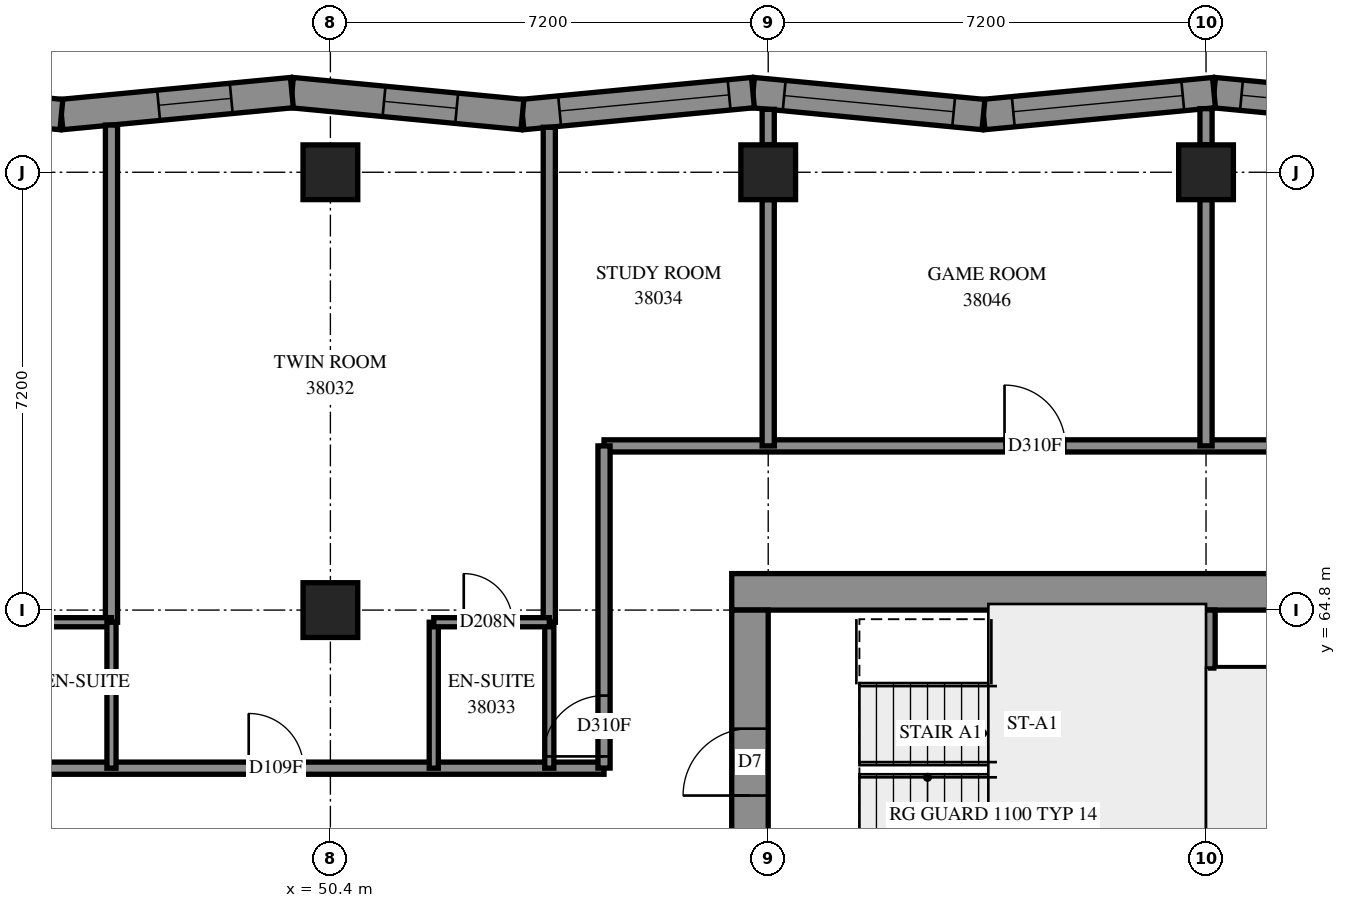
"""IFC4 building model, lengths in metres.
Left out: names, types, materials, properties, quantities, classifications, styles, units other than length and angle.
Written with IfcOpenShell. Run it as: python <this file> out.ifc"""

import sys

from ifc_helpers import new_model, si_unit, direction, frame, frame_2d, origin, origin_2d, place, context, subcontext, project, spatial, polyline, rectangle, outline, extrude, element, fill, save


model = new_model("IFC4")
c1 = context("Model", 3, precision=1e-05, world=origin(), true_north=direction((0.0, 1.0)))
c2 = subcontext(c1, "Body", "Model", "MODEL_VIEW")
j1 = project(units=[si_unit("LENGTHUNIT", "METRE"), si_unit("PLANEANGLEUNIT", "RADIAN")], contexts=[c1])
p1 = place(None, origin())
s1 = spatial("IfcSite", under=j1, at=p1, CompositionType="ELEMENT")
p2 = place(p1, origin())
s2 = spatial("IfcBuilding", under=s1, at=p2, CompositionType="ELEMENT")
p3 = place(p2, frame((0.0, 0.0, 142.2)))
s3 = spatial("IfcBuildingStorey", under=s2, at=p3, CompositionType="ELEMENT", Elevation=142.2)
for number, where, z_axis, x_axis in (
    (1, (50.4, 64.8, 0.0), (0.0, 0.0, 1.0), (1.0, 0.0, 0.0)),
    (2, (50.4, 72.0, 0.0), (0.0, 0.0, 1.0), (1.0, 0.0, 0.0)),
    (3, (57.6, 72.0, 0.0), (0.0, 0.0, 1.0), (1.0, 0.0, 0.0)),
    (4, (64.8, 72.0, 0.0), (0.0, 0.0, 1.0), (1.0, 0.0, 0.0)),
):
    element("IfcColumn", number, at=place(p3, frame(where, z_axis=z_axis, x_axis=x_axis)), inside=s3, PredefinedType="COLUMN", context=c2, shape_type="SweptSolid", body=[
        extrude(rectangle(XDim=0.9, YDim=0.9, at=origin_2d()), origin(), (0.0, 0.0, 1.0), 3.1),
    ])
p4 = place(p3, frame((57.0, 65.1, -0.3), z_axis=(0.0, 0.0, 1.0), x_axis=(1.0, 0.0, 0.0)))
e5 = element("IfcWall", 5, at=p4, inside=s3, PredefinedType="SHEAR", context=c2, shape_type="SweptSolid", body=[
    extrude(rectangle(XDim=15.6, YDim=0.6, at=frame_2d((7.8, 0.0))), origin(), (0.0, 0.0, 1.0), 2.7),
])
p5 = place(p4, frame((10.6, 0.0, 0.3)))
e6 = element("IfcOpeningElement", 6, at=p5, cuts=e5, PredefinedType="OPENING", context=c2, shape_type="SweptSolid", body=[
    extrude(rectangle(XDim=0.8, YDim=2.1, at=frame_2d((0.4, 1.05))), frame((0.0, 0.31, 0.0), z_axis=(0.0, -1.0, 0.0), x_axis=(1.0, 0.0, 0.0)), (0.0, 0.0, 1.0), 0.62),
])
p6 = place(p3, frame((57.3, 50.4, -0.3), z_axis=(0.0, 0.0, 1.0), x_axis=(0.0, 1.0, 0.0)))
e7 = element("IfcWall", 7, at=p6, inside=s3, PredefinedType="SHEAR", context=c2, shape_type="SweptSolid", body=[
    extrude(rectangle(XDim=14.4, YDim=0.6, at=frame_2d((7.2, 0.0))), origin(), (0.0, 0.0, 1.0), 2.7),
])
p7 = place(p6, frame((4.55, 0.0, 0.3)))
e8 = element("IfcOpeningElement", 8, at=p7, cuts=e7, PredefinedType="OPENING", context=c2, shape_type="SweptSolid", body=[
    extrude(rectangle(XDim=1.1, YDim=2.1, at=frame_2d((0.55, 1.05))), frame((0.0, 0.31, 0.0), z_axis=(0.0, -1.0, 0.0), x_axis=(1.0, 0.0, 0.0)), (0.0, 0.0, 1.0), 0.62),
])
p8 = place(p6, frame((11.35, 0.0, 0.3)))
e9 = element("IfcOpeningElement", 9, at=p8, cuts=e7, PredefinedType="OPENING", context=c2, shape_type="SweptSolid", body=[
    extrude(rectangle(XDim=1.1, YDim=2.1, at=frame_2d((0.55, 1.05))), frame((0.0, 0.31, 0.0), z_axis=(0.0, -1.0, 0.0), x_axis=(1.0, 0.0, 0.0)), (0.0, 0.0, 1.0), 0.62),
])
p9 = place(p3, frame((64.8, 60.6, 0.0), z_axis=(0.0, 0.0, 1.0), x_axis=(0.0, 1.0, 0.0)))
e10 = element("IfcWall", 10, at=p9, inside=s3, PredefinedType="SOLIDWALL", context=c2, shape_type="SweptSolid", body=[
    extrude(rectangle(XDim=4.2, YDim=0.3, at=frame_2d((2.1, 0.0))), origin(), (0.0, 0.0, 1.0), 3.1),
])
p10 = place(p3, frame((68.722, 72.949, 0.0), z_axis=(0.0, 0.0, 1.0), x_axis=(-0.9954966527, 0.0947967005, 0.0)))
e11 = element("IfcWall", 11, at=p10, inside=s3, PredefinedType="SOLIDWALL", context=c2, shape_type="SweptSolid", body=[
    extrude(outline(polyline([(0.024, -0.25), (3.832, -0.25), (3.784, 0.25), (-0.024, 0.25), (0.024, -0.25)])), origin(), (0.0, 0.0, 1.0), 3.1),
])
p11 = place(p10, frame((0.554, 0.0, 0.45)))
e12 = element("IfcOpeningElement", 12, at=p11, cuts=e11, PredefinedType="OPENING", context=c2, shape_type="SweptSolid", body=[
    extrude(rectangle(XDim=2.8, YDim=2.5, at=frame_2d((1.4, 1.25))), frame((0.0, 0.26, 0.0), z_axis=(0.0, -1.0, 0.0), x_axis=(1.0, 0.0, 0.0)), (0.0, 0.0, 1.0), 0.52),
])
p12 = place(p3, frame((64.931, 73.31, 0.0), z_axis=(0.0, 0.0, 1.0), x_axis=(-0.9954966527, -0.0947967005, 0.0)))
e13 = element("IfcWall", 13, at=p12, inside=s3, PredefinedType="SOLIDWALL", context=c2, shape_type="SweptSolid", body=[
    extrude(outline(polyline([(-0.024, -0.25), (3.784, -0.25), (3.832, 0.25), (0.024, 0.25), (-0.024, -0.25)])), origin(), (0.0, 0.0, 1.0), 3.1),
])
p13 = place(p12, frame((0.516, 0.0, 0.45)))
e14 = element("IfcOpeningElement", 14, at=p13, cuts=e13, PredefinedType="OPENING", context=c2, shape_type="SweptSolid", body=[
    extrude(rectangle(XDim=2.8, YDim=2.5, at=frame_2d((1.4, 1.25))), frame((0.0, 0.26, 0.0), z_axis=(0.0, -1.0, 0.0), x_axis=(1.0, 0.0, 0.0)), (0.0, 0.0, 1.0), 0.52),
])
p14 = place(p3, frame((61.14, 72.949, 0.0), z_axis=(0.0, 0.0, 1.0), x_axis=(-0.9954966527, 0.0947967005, 0.0)))
e15 = element("IfcWall", 15, at=p14, inside=s3, PredefinedType="SOLIDWALL", context=c2, shape_type="SweptSolid", body=[
    extrude(outline(polyline([(0.024, -0.25), (3.832, -0.25), (3.784, 0.25), (-0.024, 0.25), (0.024, -0.25)])), origin(), (0.0, 0.0, 1.0), 3.1),
])
p15 = place(p14, frame((0.492, 0.0, 0.45)))
e16 = element("IfcOpeningElement", 16, at=p15, cuts=e15, PredefinedType="OPENING", context=c2, shape_type="SweptSolid", body=[
    extrude(rectangle(XDim=2.8, YDim=2.5, at=frame_2d((1.4, 1.25))), frame((0.0, 0.26, 0.0), z_axis=(0.0, -1.0, 0.0), x_axis=(1.0, 0.0, 0.0)), (0.0, 0.0, 1.0), 0.52),
])
p16 = place(p3, frame((57.349, 73.31, 0.0), z_axis=(0.0, 0.0, 1.0), x_axis=(-0.9954966527, -0.0947967005, 0.0)))
e17 = element("IfcWall", 17, at=p16, inside=s3, PredefinedType="SOLIDWALL", context=c2, shape_type="SweptSolid", body=[
    extrude(outline(polyline([(-0.024, -0.25), (3.784, -0.25), (3.832, 0.25), (0.024, 0.25), (-0.024, -0.25)])), origin(), (0.0, 0.0, 1.0), 3.1),
])
p17 = place(p16, frame((0.394, 0.0, 0.45)))
e18 = element("IfcOpeningElement", 18, at=p17, cuts=e17, PredefinedType="OPENING", context=c2, shape_type="SweptSolid", body=[
    extrude(rectangle(XDim=2.8, YDim=2.5, at=frame_2d((1.4, 1.25))), frame((0.0, 0.26, 0.0), z_axis=(0.0, -1.0, 0.0), x_axis=(1.0, 0.0, 0.0)), (0.0, 0.0, 1.0), 0.52),
])
p18 = place(p3, frame((53.558, 72.949, 0.0), z_axis=(0.0, 0.0, 1.0), x_axis=(-0.9954966527, 0.0947967005, 0.0)))
e19 = element("IfcWall", 19, at=p18, inside=s3, PredefinedType="SOLIDWALL", context=c2, shape_type="SweptSolid", body=[
    extrude(outline(polyline([(0.024, -0.25), (3.832, -0.25), (3.784, 0.25), (-0.024, 0.25), (0.024, -0.25)])), origin(), (0.0, 0.0, 1.0), 3.1),
])
p19 = place(p18, frame((1.086, 0.0, 0.45)))
e20 = element("IfcOpeningElement", 20, at=p19, cuts=e19, PredefinedType="OPENING", context=c2, shape_type="SweptSolid", body=[
    extrude(rectangle(XDim=1.2, YDim=2.5, at=frame_2d((0.6, 1.25))), frame((0.0, 0.26, 0.0), z_axis=(0.0, -1.0, 0.0), x_axis=(1.0, 0.0, 0.0)), (0.0, 0.0, 1.0), 0.52),
])
p20 = place(p3, frame((49.767, 73.31, 0.0), z_axis=(0.0, 0.0, 1.0), x_axis=(-0.9954966527, -0.0947967005, 0.0)))
e21 = element("IfcWall", 21, at=p20, inside=s3, PredefinedType="SOLIDWALL", context=c2, shape_type="SweptSolid", body=[
    extrude(outline(polyline([(-0.024, -0.25), (3.784, -0.25), (3.832, 0.25), (0.024, 0.25), (-0.024, -0.25)])), origin(), (0.0, 0.0, 1.0), 3.1),
])
p21 = place(p20, frame((1.002, 0.0, 0.45)))
e22 = element("IfcOpeningElement", 22, at=p21, cuts=e21, PredefinedType="OPENING", context=c2, shape_type="SweptSolid", body=[
    extrude(rectangle(XDim=1.2, YDim=2.5, at=frame_2d((0.6, 1.25))), frame((0.0, 0.26, 0.0), z_axis=(0.0, -1.0, 0.0), x_axis=(1.0, 0.0, 0.0)), (0.0, 0.0, 1.0), 0.52),
])
p22 = place(p3, frame((45.976, 72.949, 0.0), z_axis=(0.0, 0.0, 1.0), x_axis=(-0.9954966527, 0.0947967005, 0.0)))
e23 = element("IfcWall", 23, at=p22, inside=s3, PredefinedType="SOLIDWALL", context=c2, shape_type="SweptSolid", body=[
    extrude(outline(polyline([(0.024, -0.25), (3.832, -0.25), (3.784, 0.25), (-0.024, 0.25), (0.024, -0.25)])), origin(), (0.0, 0.0, 1.0), 3.1),
])
p23 = place(p22, frame((0.894, 0.0, 0.45)))
e24 = element("IfcOpeningElement", 24, at=p23, cuts=e23, PredefinedType="OPENING", context=c2, shape_type="SweptSolid", body=[
    extrude(rectangle(XDim=1.2, YDim=2.5, at=frame_2d((0.6, 1.25))), frame((0.0, 0.26, 0.0), z_axis=(0.0, -1.0, 0.0), x_axis=(1.0, 0.0, 0.0)), (0.0, 0.0, 1.0), 0.52),
])
p24 = place(p3, frame((64.95, 63.78, 0.0), z_axis=(0.0, 0.0, 1.0), x_axis=(1.0, 0.0, 0.0)))
e25 = element("IfcWall", 25, at=p24, inside=s3, PredefinedType="PARTITIONING", context=c2, shape_type="SweptSolid", body=[
    extrude(rectangle(XDim=5.65, YDim=0.15, at=frame_2d((2.825, 0.0))), origin(), (0.0, 0.0, 1.0), 3.1),
])
p25 = place(p3, frame((54.9, 67.5, 0.0), z_axis=(0.0, 0.0, 1.0), x_axis=(1.0, 0.0, 0.0)))
e26 = element("IfcWall", 26, at=p25, inside=s3, PredefinedType="PARTITIONING", context=c2, shape_type="SweptSolid", body=[
    extrude(rectangle(XDim=19.8, YDim=0.2, at=frame_2d((9.9, 0.0))), origin(), (0.0, 0.0, 1.0), 3.1),
])
p26 = place(p25, frame((6.586, 0.0, 0.0)))
e27 = element("IfcOpeningElement", 27, at=p26, cuts=e26, PredefinedType="OPENING", context=c2, shape_type="SweptSolid", body=[
    extrude(rectangle(XDim=1.0, YDim=2.1, at=frame_2d((0.5, 1.05))), frame((0.0, 0.11, 0.0), z_axis=(0.0, -1.0, 0.0), x_axis=(1.0, 0.0, 0.0)), (0.0, 0.0, 1.0), 0.22),
])
p27 = place(p25, frame((14.089, 0.0, 0.0)))
e28 = element("IfcOpeningElement", 28, at=p27, cuts=e26, PredefinedType="OPENING", context=c2, shape_type="SweptSolid", body=[
    extrude(rectangle(XDim=1.0, YDim=2.1, at=frame_2d((0.5, 1.05))), frame((0.0, 0.11, 0.0), z_axis=(0.0, -1.0, 0.0), x_axis=(1.0, 0.0, 0.0)), (0.0, 0.0, 1.0), 0.22),
])
p28 = place(p3, frame((40.602, 62.2, 0.0), z_axis=(0.0, 0.0, 1.0), x_axis=(1.0, 0.0, 0.0)))
e29 = element("IfcWall", 29, at=p28, inside=s3, PredefinedType="PARTITIONING", context=c2, shape_type="SweptSolid", body=[
    extrude(rectangle(XDim=14.298, YDim=0.2, at=frame_2d((7.149, 0.0))), origin(), (0.0, 0.0, 1.0), 3.1),
])
p29 = place(p28, frame((1.306, 0.0, 0.0)))
e30 = element("IfcOpeningElement", 30, at=p29, cuts=e29, PredefinedType="OPENING", context=c2, shape_type="SweptSolid", body=[
    extrude(rectangle(XDim=0.9, YDim=2.1, at=frame_2d((0.45, 1.05))), frame((0.0, 0.11, 0.0), z_axis=(0.0, -1.0, 0.0), x_axis=(1.0, 0.0, 0.0)), (0.0, 0.0, 1.0), 0.22),
])
p30 = place(p28, frame((8.455, 0.0, 0.0)))
e31 = element("IfcOpeningElement", 31, at=p30, cuts=e29, PredefinedType="OPENING", context=c2, shape_type="SweptSolid", body=[
    extrude(rectangle(XDim=0.9, YDim=2.1, at=frame_2d((0.45, 1.05))), frame((0.0, 0.11, 0.0), z_axis=(0.0, -1.0, 0.0), x_axis=(1.0, 0.0, 0.0)), (0.0, 0.0, 1.0), 0.22),
])
p31 = place(p3, frame((46.8, 64.6, 0.0), z_axis=(0.0, 0.0, 1.0), x_axis=(0.0, 1.0, 0.0)))
e32 = element("IfcWall", 32, at=p31, inside=s3, PredefinedType="PARTITIONING", context=c2, shape_type="SweptSolid", body=[
    extrude(rectangle(XDim=8.176, YDim=0.2, at=frame_2d((4.088, 0.0))), origin(), (0.0, 0.0, 1.0), 3.1),
])
p32 = place(p3, frame((54.0, 64.6, 0.0), z_axis=(0.0, 0.0, 1.0), x_axis=(0.0, 1.0, 0.0)))
e33 = element("IfcWall", 33, at=p32, inside=s3, PredefinedType="PARTITIONING", context=c2, shape_type="SweptSolid", body=[
    extrude(rectangle(XDim=8.14, YDim=0.2, at=frame_2d((4.07, 0.0))), origin(), (0.0, 0.0, 1.0), 3.1),
])
p33 = place(p3, frame((54.9, 62.202, 0.0), z_axis=(0.0, 0.0, 1.0), x_axis=(0.0, 1.0, 0.0)))
e34 = element("IfcWall", 34, at=p33, inside=s3, PredefinedType="PARTITIONING", context=c2, shape_type="SweptSolid", body=[
    extrude(rectangle(XDim=5.298, YDim=0.2, at=frame_2d((2.649, 0.0))), origin(), (0.0, 0.0, 1.0), 3.1),
])
p34 = place(p33, frame((0.192, 0.0, 0.0)))
e35 = element("IfcOpeningElement", 35, at=p34, cuts=e34, PredefinedType="OPENING", context=c2, shape_type="SweptSolid", body=[
    extrude(rectangle(XDim=1.0, YDim=2.1, at=frame_2d((0.5, 1.05))), frame((0.0, 0.11, 0.0), z_axis=(0.0, -1.0, 0.0), x_axis=(1.0, 0.0, 0.0)), (0.0, 0.0, 1.0), 0.22),
])
for number, where, z_axis, x_axis in (
    (36, (57.6, 67.5, 0.0), (0.0, 0.0, 1.0), (0.0, 1.0, 0.0)),
    (37, (64.8, 67.5, 0.0), (0.0, 0.0, 1.0), (0.0, 1.0, 0.0)),
):
    element("IfcWall", number, at=place(p3, frame(where, z_axis=z_axis, x_axis=x_axis)), inside=s3, PredefinedType="PARTITIONING", context=c2, shape_type="SweptSolid", body=[
        extrude(rectangle(XDim=4.05, YDim=0.2, at=frame_2d((2.025, 0.0))), origin(), (0.0, 0.0, 1.0), 3.1),
    ])
p35 = place(p3, frame((44.0, 64.6, 0.0), z_axis=(0.0, 0.0, 1.0), x_axis=(1.0, 0.0, 0.0)))
e38 = element("IfcWall", 38, at=p35, inside=s3, PredefinedType="PARTITIONING", context=c2, shape_type="SweptSolid", body=[
    extrude(rectangle(XDim=2.8, YDim=0.15, at=frame_2d((1.4, 0.0))), origin(), (0.0, 0.0, 1.0), 3.1),
])
p36 = place(p35, frame((0.94, 0.0, 0.0)))
e39 = element("IfcOpeningElement", 39, at=p36, cuts=e38, PredefinedType="OPENING", context=c2, shape_type="SweptSolid", body=[
    extrude(rectangle(XDim=0.8, YDim=2.1, at=frame_2d((0.4, 1.05))), frame((0.0, 0.085, 0.0), z_axis=(0.0, -1.0, 0.0), x_axis=(1.0, 0.0, 0.0)), (0.0, 0.0, 1.0), 0.17),
])
for number, where, z_axis, x_axis in (
    (40, (46.8, 62.2, 0.0), (0.0, 0.0, 1.0), (0.0, 1.0, 0.0)),
    (41, (52.1, 62.2, 0.0), (0.0, 0.0, 1.0), (0.0, 1.0, 0.0)),
    (42, (54.0, 62.2, 0.0), (0.0, 0.0, 1.0), (0.0, 1.0, 0.0)),
):
    element("IfcWall", number, at=place(p3, frame(where, z_axis=z_axis, x_axis=x_axis)), inside=s3, PredefinedType="PARTITIONING", context=c2, shape_type="SweptSolid", body=[
        extrude(rectangle(XDim=2.4, YDim=0.15, at=frame_2d((1.2, 0.0))), origin(), (0.0, 0.0, 1.0), 3.1),
    ])
p37 = place(p3, frame((52.1, 64.6, 0.0), z_axis=(0.0, 0.0, 1.0), x_axis=(1.0, 0.0, 0.0)))
e43 = element("IfcWall", 43, at=p37, inside=s3, PredefinedType="PARTITIONING", context=c2, shape_type="SweptSolid", body=[
    extrude(rectangle(XDim=1.9, YDim=0.15, at=frame_2d((0.95, 0.0))), origin(), (0.0, 0.0, 1.0), 3.1),
])
p38 = place(p37, frame((0.493, 0.0, 0.0)))
e44 = element("IfcOpeningElement", 44, at=p38, cuts=e43, PredefinedType="OPENING", context=c2, shape_type="SweptSolid", body=[
    extrude(rectangle(XDim=0.8, YDim=2.1, at=frame_2d((0.4, 1.05))), frame((0.0, 0.085, 0.0), z_axis=(0.0, -1.0, 0.0), x_axis=(1.0, 0.0, 0.0)), (0.0, 0.0, 1.0), 0.17),
])
p39 = place(p3, frame((64.8, 72.45, 0.0), z_axis=(0.0, 0.0, 1.0), x_axis=(0.0, 1.0, 0.0)))
e45 = element("IfcWall", 45, at=p39, inside=s3, PredefinedType="PARTITIONING", context=c2, shape_type="SweptSolid", body=[
    extrude(rectangle(XDim=0.596, YDim=0.2, at=frame_2d((0.298, 0.0))), origin(), (0.0, 0.0, 1.0), 3.1),
])
p40 = place(p3, frame((57.6, 72.45, 0.0), z_axis=(0.0, 0.0, 1.0), x_axis=(0.0, 1.0, 0.0)))
e46 = element("IfcWall", 46, at=p40, inside=s3, PredefinedType="PARTITIONING", context=c2, shape_type="SweptSolid", body=[
    extrude(rectangle(XDim=0.585, YDim=0.2, at=frame_2d((0.292, 0.0))), origin(), (0.0, 0.0, 1.0), 3.1),
])
p41 = place(p11, origin())
e47 = element("IfcWindow", 47, at=p41, inside=s3, PartitioningType="SINGLE_PANEL", PredefinedType="WINDOW", context=c2, shape_type="SweptSolid", body=[
    extrude(rectangle(XDim=2.8, YDim=2.5, at=frame_2d((1.4, 1.25))), frame((0.0, 0.18, 0.0), z_axis=(0.0, -1.0, 0.0), x_axis=(1.0, 0.0, 0.0)), (0.0, 0.0, 1.0), 0.06),
])
fill(e12, e47)
p42 = place(p13, origin())
e48 = element("IfcWindow", 48, at=p42, inside=s3, PartitioningType="SINGLE_PANEL", PredefinedType="WINDOW", context=c2, shape_type="SweptSolid", body=[
    extrude(rectangle(XDim=2.8, YDim=2.5, at=frame_2d((1.4, 1.25))), frame((0.0, 0.18, 0.0), z_axis=(0.0, -1.0, 0.0), x_axis=(1.0, 0.0, 0.0)), (0.0, 0.0, 1.0), 0.06),
])
fill(e14, e48)
p43 = place(p15, origin())
e49 = element("IfcWindow", 49, at=p43, inside=s3, PartitioningType="SINGLE_PANEL", PredefinedType="WINDOW", context=c2, shape_type="SweptSolid", body=[
    extrude(rectangle(XDim=2.8, YDim=2.5, at=frame_2d((1.4, 1.25))), frame((0.0, 0.18, 0.0), z_axis=(0.0, -1.0, 0.0), x_axis=(1.0, 0.0, 0.0)), (0.0, 0.0, 1.0), 0.06),
])
fill(e16, e49)
p44 = place(p17, origin())
e50 = element("IfcWindow", 50, at=p44, inside=s3, PartitioningType="SINGLE_PANEL", PredefinedType="WINDOW", context=c2, shape_type="SweptSolid", body=[
    extrude(rectangle(XDim=2.8, YDim=2.5, at=frame_2d((1.4, 1.25))), frame((0.0, 0.18, 0.0), z_axis=(0.0, -1.0, 0.0), x_axis=(1.0, 0.0, 0.0)), (0.0, 0.0, 1.0), 0.06),
])
fill(e18, e50)
p45 = place(p19, origin())
e51 = element("IfcWindow", 51, at=p45, inside=s3, PartitioningType="SINGLE_PANEL", PredefinedType="WINDOW", context=c2, shape_type="SweptSolid", body=[
    extrude(rectangle(XDim=1.2, YDim=2.5, at=frame_2d((0.6, 1.25))), frame((0.0, 0.18, 0.0), z_axis=(0.0, -1.0, 0.0), x_axis=(1.0, 0.0, 0.0)), (0.0, 0.0, 1.0), 0.06),
])
fill(e20, e51)
p46 = place(p21, origin())
e52 = element("IfcWindow", 52, at=p46, inside=s3, PartitioningType="SINGLE_PANEL", PredefinedType="WINDOW", context=c2, shape_type="SweptSolid", body=[
    extrude(rectangle(XDim=1.2, YDim=2.5, at=frame_2d((0.6, 1.25))), frame((0.0, 0.18, 0.0), z_axis=(0.0, -1.0, 0.0), x_axis=(1.0, 0.0, 0.0)), (0.0, 0.0, 1.0), 0.06),
])
fill(e22, e52)
p47 = place(p8, origin())
e53 = element("IfcDoor", 53, at=p47, inside=s3, OperationType="SINGLE_SWING_LEFT", PredefinedType="DOOR", context=c2, shape_type="SweptSolid", body=[
    extrude(rectangle(XDim=1.1, YDim=2.1, at=frame_2d((0.55, 1.05))), frame((0.0, 0.025, 0.0), z_axis=(0.0, -1.0, 0.0), x_axis=(1.0, 0.0, 0.0)), (0.0, 0.0, 1.0), 0.05),
])
fill(e9, e53)
p48 = place(p30, origin())
e54 = element("IfcDoor", 54, at=p48, inside=s3, OperationType="SINGLE_SWING_LEFT", PredefinedType="DOOR", context=c2, shape_type="SweptSolid", body=[
    extrude(rectangle(XDim=0.9, YDim=2.1, at=frame_2d((0.45, 1.05))), frame((0.0, 0.025, 0.0), z_axis=(0.0, -1.0, 0.0), x_axis=(1.0, 0.0, 0.0)), (0.0, 0.0, 1.0), 0.05),
])
fill(e31, e54)
p49 = place(p38, origin())
e55 = element("IfcDoor", 55, at=p49, inside=s3, OperationType="SINGLE_SWING_RIGHT", PredefinedType="DOOR", context=c2, shape_type="SweptSolid", body=[
    extrude(rectangle(XDim=0.8, YDim=2.1, at=frame_2d((0.4, 1.05))), frame((0.0, 0.025, 0.0), z_axis=(0.0, -1.0, 0.0), x_axis=(1.0, 0.0, 0.0)), (0.0, 0.0, 1.0), 0.05),
])
fill(e44, e55)
p50 = place(p34, origin())
e56 = element("IfcDoor", 56, at=p50, inside=s3, OperationType="SINGLE_SWING_LEFT", PredefinedType="DOOR", context=c2, shape_type="SweptSolid", body=[
    extrude(rectangle(XDim=1.0, YDim=2.1, at=frame_2d((0.5, 1.05))), frame((0.0, 0.025, 0.0), z_axis=(0.0, -1.0, 0.0), x_axis=(1.0, 0.0, 0.0)), (0.0, 0.0, 1.0), 0.05),
])
fill(e35, e56)
p51 = place(p26, origin())
e57 = element("IfcDoor", 57, at=p51, inside=s3, OperationType="SINGLE_SWING_RIGHT", PredefinedType="DOOR", context=c2, shape_type="SweptSolid", body=[
    extrude(rectangle(XDim=1.0, YDim=2.1, at=frame_2d((0.5, 1.05))), frame((0.0, 0.025, 0.0), z_axis=(0.0, -1.0, 0.0), x_axis=(1.0, 0.0, 0.0)), (0.0, 0.0, 1.0), 0.05),
])
fill(e27, e57)
save(model, sys.argv[1])
